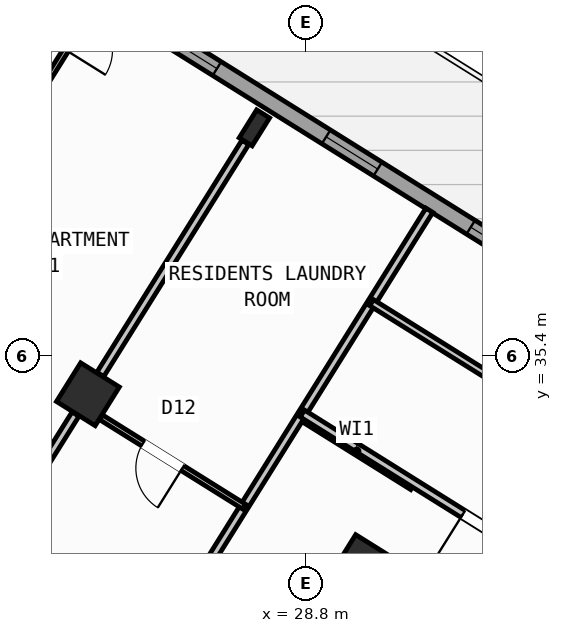
"""IFC4 building model, lengths in metres.
Left out: names, types, materials, properties, quantities, classifications, styles, units other than length and angle.
Written with IfcOpenShell. Run it as: python <this file> out.ifc"""

import sys

from ifc_helpers import new_model, si_unit, direction, frame, frame_2d, origin, origin_2d, place, context, subcontext, project, spatial, rectangle, hollow_rectangle, i_section, extrude, source, transform, mapped, element, fill, save


model = new_model("IFC4")
c1 = context("Model", 3, precision=1e-05, world=origin(), true_north=direction((0.0, 1.0)))
c2 = subcontext(c1, "Body", "Model", "MODEL_VIEW")
j1 = project(units=[si_unit("LENGTHUNIT", "METRE"), si_unit("PLANEANGLEUNIT", "RADIAN")], contexts=[c1])
p1 = place(None, origin())
s1 = spatial("IfcSite", under=j1, at=p1, CompositionType="ELEMENT")
p2 = place(p1, origin())
s2 = spatial("IfcBuilding", under=s1, at=p2, CompositionType="ELEMENT")
p3 = place(p2, frame((0.0, 0.0, 105.3)))
s3 = spatial("IfcBuildingStorey", under=s2, at=p3, CompositionType="ELEMENT", Elevation=105.3)
m1 = source(origin(), c2, "Body", "SweptSolid", [
    extrude(hollow_rectangle(XDim=0.9, YDim=0.9, WallThickness=0.036, at=origin_2d()), origin(), (0.0, 0.0, 1.0), 3.6),
])
p4 = place(p3, frame((29.928, 31.251, 0.0), z_axis=(0.0, 0.0, 1.0), x_axis=(-0.848048096156, 0.529919264233, 0.0)))
e1 = element("IfcColumn", 1, at=p4, inside=s3, PredefinedType="COLUMN", context=c2, shape_type="MappedRepresentation", body=[
    mapped(m1, transform((0.0, 0.0, 0.0), scale=1.0)),
])
m2 = source(origin(), c2, "Body", "SweptSolid", [
    extrude(i_section(OverallWidth=0.3, OverallDepth=0.65, WebThickness=0.016, FlangeThickness=0.031, at=origin_2d()), origin(), (0.0, 0.0, 1.0), 3.6),
])
p5 = place(p3, frame((27.786, 39.901, 0.0), z_axis=(0.0, 0.0, 1.0), x_axis=(-0.848048096156, 0.529919264233, 0.0)))
e2 = element("IfcColumn", 2, at=p5, inside=s3, PredefinedType="COLUMN", context=c2, shape_type="MappedRepresentation", body=[
    mapped(m2, transform((0.0, 0.0, 0.0), scale=1.0)),
])
p6 = place(p3, frame((24.5, 34.643, 0.0), z_axis=(0.0, 0.0, 1.0), x_axis=(-0.848048096156, 0.529919264233, 0.0)))
e3 = element("IfcColumn", 3, at=p6, inside=s3, PredefinedType="COLUMN", context=c2, shape_type="MappedRepresentation", body=[
    mapped(m1, transform((0.0, 0.0, 0.0), scale=1.0)),
])
p7 = place(p3, frame((17.424, 47.083, 0.0), z_axis=(0.0, 0.0, 1.0), x_axis=(0.848049927979, -0.529916332693, 0.0)))
e4 = element("IfcWall", 4, at=p7, inside=s3, PredefinedType="STANDARD", context=c2, shape_type="SweptSolid", body=[
    extrude(rectangle(XDim=29.223, YDim=0.32, at=frame_2d((14.612, 0.0))), origin(), (0.0, 0.0, 1.0), 3.35),
])
p8 = place(p7, frame((3.709, 0.0, 0.0)))
e5 = element("IfcOpeningElement", 5, at=p8, cuts=e4, PredefinedType="OPENING", context=c2, shape_type="SweptSolid", body=[
    extrude(rectangle(XDim=1.05, YDim=2.15, at=frame_2d((0.525, 1.075))), frame((0.0, 0.17, 0.0), z_axis=(0.0, -1.0, 0.0), x_axis=(1.0, 0.0, 0.0)), (0.0, 0.0, 1.0), 0.34),
])
p9 = place(p7, frame((0.659, 0.0, 0.95)))
e6 = element("IfcOpeningElement", 6, at=p9, cuts=e4, PredefinedType="OPENING", context=c2, shape_type="SweptSolid", body=[
    extrude(rectangle(XDim=1.2, YDim=1.4, at=frame_2d((0.6, 0.7))), frame((0.0, 0.17, 0.0), z_axis=(0.0, -1.0, 0.0), x_axis=(1.0, 0.0, 0.0)), (0.0, 0.0, 1.0), 0.34),
])
p10 = place(p7, frame((6.972, 0.0, 1.0)))
e7 = element("IfcOpeningElement", 7, at=p10, cuts=e4, PredefinedType="OPENING", context=c2, shape_type="SweptSolid", body=[
    extrude(rectangle(XDim=0.9, YDim=1.25, at=frame_2d((0.45, 0.625))), frame((0.0, 0.17, 0.0), z_axis=(0.0, -1.0, 0.0), x_axis=(1.0, 0.0, 0.0)), (0.0, 0.0, 1.0), 0.34),
])
p11 = place(p7, frame((9.847, 0.0, 0.85)))
e8 = element("IfcOpeningElement", 8, at=p11, cuts=e4, PredefinedType="OPENING", context=c2, shape_type="SweptSolid", body=[
    extrude(rectangle(XDim=1.5, YDim=1.5, at=frame_2d((0.75, 0.75))), frame((0.0, 0.17, 0.0), z_axis=(0.0, -1.0, 0.0), x_axis=(1.0, 0.0, 0.0)), (0.0, 0.0, 1.0), 0.34),
])
p12 = place(p7, frame((13.889, 0.0, 0.95)))
e9 = element("IfcOpeningElement", 9, at=p12, cuts=e4, PredefinedType="OPENING", context=c2, shape_type="SweptSolid", body=[
    extrude(rectangle(XDim=1.2, YDim=1.4, at=frame_2d((0.6, 0.7))), frame((0.0, 0.17, 0.0), z_axis=(0.0, -1.0, 0.0), x_axis=(1.0, 0.0, 0.0)), (0.0, 0.0, 1.0), 0.34),
])
p13 = place(p7, frame((17.254, 0.0, 1.0)))
e10 = element("IfcOpeningElement", 10, at=p13, cuts=e4, PredefinedType="OPENING", context=c2, shape_type="SweptSolid", body=[
    extrude(rectangle(XDim=0.9, YDim=1.25, at=frame_2d((0.45, 0.625))), frame((0.0, 0.17, 0.0), z_axis=(0.0, -1.0, 0.0), x_axis=(1.0, 0.0, 0.0)), (0.0, 0.0, 1.0), 0.34),
])
p14 = place(p7, frame((20.764, 0.0, 0.8)))
e11 = element("IfcOpeningElement", 11, at=p14, cuts=e4, PredefinedType="OPENING", context=c2, shape_type="SweptSolid", body=[
    extrude(rectangle(XDim=2.1, YDim=1.55, at=frame_2d((1.05, 0.775))), frame((0.0, 0.17, 0.0), z_axis=(0.0, -1.0, 0.0), x_axis=(1.0, 0.0, 0.0)), (0.0, 0.0, 1.0), 0.34),
])
p15 = place(p7, frame((25.403, 0.0, 0.8)))
e12 = element("IfcOpeningElement", 12, at=p15, cuts=e4, PredefinedType="OPENING", context=c2, shape_type="SweptSolid", body=[
    extrude(rectangle(XDim=2.1, YDim=1.55, at=frame_2d((1.05, 0.775))), frame((0.0, 0.17, 0.0), z_axis=(0.0, -1.0, 0.0), x_axis=(1.0, 0.0, 0.0)), (0.0, 0.0, 1.0), 0.34),
])
p16 = place(p3, frame((30.914, 32.829, 0.0), z_axis=(0.0, 0.0, 1.0), x_axis=(-0.848008813643, 0.529982124211, 0.0)))
e13 = element("IfcWall", 13, at=p16, inside=s3, PredefinedType="PARTITIONING", context=c2, shape_type="SweptSolid", body=[
    extrude(rectangle(XDim=2.61, YDim=0.16, at=frame_2d((1.305, 0.0))), origin(), (0.0, 0.0, 1.0), 3.34),
])
p17 = place(p3, frame((31.239, 38.274, 0.0), z_axis=(0.0, 0.0, 1.0), x_axis=(-0.529918119251, -0.84804881162, 0.0)))
e14 = element("IfcWall", 14, at=p17, inside=s3, PredefinedType="PARTITIONING", context=c2, shape_type="SweptSolid", body=[
    extrude(rectangle(XDim=17.65, YDim=0.16, at=frame_2d((8.825, 0.0))), origin(), (0.0, 0.0, 1.0), 3.34),
])
p18 = place(p3, frame((27.607, 39.615, 0.0), z_axis=(0.0, 0.0, 1.0), x_axis=(-0.529913610495, -0.848051628978, 0.0)))
e15 = element("IfcWall", 15, at=p18, inside=s3, PredefinedType="PARTITIONING", context=c2, shape_type="SweptSolid", body=[
    extrude(rectangle(XDim=5.401, YDim=0.16, at=frame_2d((2.7, 0.0))), origin(), (0.0, 0.0, 1.0), 2.775),
])
p19 = place(p3, frame((24.256, 34.251, 0.0), z_axis=(0.0, 0.0, 1.0), x_axis=(-0.529919772691, -0.848047778437, 0.0)))
e16 = element("IfcWall", 16, at=p19, inside=s3, PredefinedType="PARTITIONING", context=c2, shape_type="SweptSolid", body=[
    extrude(rectangle(XDim=6.376, YDim=0.16, at=frame_2d((3.188, 0.0))), origin(), (0.0, 0.0, 1.0), 2.775),
])
p20 = place(p3, frame((27.583, 32.424, 0.0), z_axis=(0.0, 0.0, 1.0), x_axis=(-0.848031272749, 0.529946186362, 0.0)))
e17 = element("IfcWall", 17, at=p20, inside=s3, PredefinedType="PARTITIONING", context=c2, shape_type="SweptSolid", body=[
    extrude(rectangle(XDim=3.328, YDim=0.11, at=frame_2d((1.664, 0.0))), origin(), (0.0, 0.0, 1.0), 2.775),
])
p21 = place(p20, frame((1.435, 0.0, 0.0)))
e18 = element("IfcOpeningElement", 18, at=p21, cuts=e17, PredefinedType="OPENING", context=c2, shape_type="SweptSolid", body=[
    extrude(rectangle(XDim=0.92, YDim=2.08, at=frame_2d((0.46, 1.04))), frame((0.0, 0.065, 0.0), z_axis=(0.0, -1.0, 0.0), x_axis=(1.0, 0.0, 0.0)), (0.0, 0.0, 1.0), 0.13),
])
p22 = place(p3, frame((24.802, 42.614, 0.0), z_axis=(0.0, 0.0, 1.0), x_axis=(-0.529928839727, -0.848042112649, 0.0)))
e19 = element("IfcWall", 19, at=p22, inside=s3, PredefinedType="PARTITIONING", context=c2, shape_type="SweptSolid", body=[
    extrude(rectangle(XDim=15.34, YDim=0.11, at=frame_2d((7.67, 0.0))), origin(), (0.0, 0.0, 1.0), 3.34),
])
p23 = place(p22, frame((0.47, 0.0, 0.0)))
e20 = element("IfcOpeningElement", 20, at=p23, cuts=e19, PredefinedType="OPENING", context=c2, shape_type="SweptSolid", body=[
    extrude(rectangle(XDim=0.92, YDim=2.08, at=frame_2d((0.46, 1.04))), frame((0.0, 0.065, 0.0), z_axis=(0.0, -1.0, 0.0), x_axis=(1.0, 0.0, 0.0)), (0.0, 0.0, 1.0), 0.13),
])
p24 = place(p3, frame((41.936, 26.012, 0.0), z_axis=(0.0, 0.0, 1.0), x_axis=(-0.848051154596, 0.529914369676, 0.0)))
e21 = element("IfcWall", 21, at=p24, inside=s3, PredefinedType="PARTITIONING", context=c2, shape_type="SweptSolid", body=[
    extrude(rectangle(XDim=15.57, YDim=0.16, at=frame_2d((7.785, 0.0))), origin(), (0.0, 0.0, 1.0), 3.34),
])
p25 = place(p24, frame((10.83, 0.0, 0.0)))
e22 = element("IfcOpeningElement", 22, at=p25, cuts=e21, PredefinedType="OPENING", context=c2, shape_type="SweptSolid", body=[
    extrude(rectangle(XDim=1.0, YDim=2.1, at=frame_2d((0.5, 1.05))), frame((0.0, 0.09, 0.0), z_axis=(0.0, -1.0, 0.0), x_axis=(1.0, 0.0, 0.0)), (0.0, 0.0, 1.0), 0.18),
])
p26 = place(p3, frame((42.226, 28.873, 0.0), z_axis=(0.0, 0.0, 1.0), x_axis=(-0.848049134363, 0.529917602752, 0.0)))
e23 = element("IfcWall", 23, at=p26, inside=s3, PredefinedType="PLUMBINGWALL", context=c2, shape_type="SweptSolid", body=[
    extrude(rectangle(XDim=14.3, YDim=0.14, at=frame_2d((7.15, 0.0))), origin(), (0.0, 0.0, 1.0), 3.34),
])
p27 = place(p26, frame((9.57, 0.0, 0.0)))
e24 = element("IfcOpeningElement", 24, at=p27, cuts=e23, PredefinedType="OPENING", context=c2, shape_type="SweptSolid", body=[
    extrude(rectangle(XDim=0.92, YDim=2.08, at=frame_2d((0.46, 1.04))), frame((0.0, 0.08, 0.0), z_axis=(0.0, -1.0, 0.0), x_axis=(1.0, 0.0, 0.0)), (0.0, 0.0, 1.0), 0.16),
])
m3 = source(origin(), c2, "Body", "SweptSolid", [
    extrude(rectangle(XDim=1.5, YDim=1.5, at=frame_2d((0.75, 0.75))), frame((0.0, 0.03, 0.0), z_axis=(0.0, -1.0, 0.0), x_axis=(1.0, 0.0, 0.0)), (0.0, 0.0, 1.0), 0.06),
])
p28 = place(p11, origin())
e25 = element("IfcWindow", 25, at=p28, inside=s3, PartitioningType="SINGLE_PANEL", PredefinedType="WINDOW", context=c2, shape_type="MappedRepresentation", body=[
    mapped(m3, transform((0.0, 0.0, 0.0), scale=1.0)),
])
fill(e8, e25)
m4 = source(origin(), c2, "Body", "SweptSolid", [
    extrude(rectangle(XDim=1.2, YDim=1.4, at=frame_2d((0.6, 0.7))), frame((0.0, 0.03, 0.0), z_axis=(0.0, -1.0, 0.0), x_axis=(1.0, 0.0, 0.0)), (0.0, 0.0, 1.0), 0.06),
])
p29 = place(p12, origin())
e26 = element("IfcWindow", 26, at=p29, inside=s3, PartitioningType="SINGLE_PANEL", PredefinedType="WINDOW", context=c2, shape_type="MappedRepresentation", body=[
    mapped(m4, transform((0.0, 0.0, 0.0), scale=1.0)),
])
fill(e9, e26)
m5 = source(origin(), c2, "Body", "SweptSolid", [
    extrude(rectangle(XDim=0.9, YDim=1.25, at=frame_2d((0.45, 0.625))), frame((0.0, 0.03, 0.0), z_axis=(0.0, -1.0, 0.0), x_axis=(1.0, 0.0, 0.0)), (0.0, 0.0, 1.0), 0.06),
])
p30 = place(p13, origin())
e27 = element("IfcWindow", 27, at=p30, inside=s3, PartitioningType="SINGLE_PANEL", PredefinedType="WINDOW", context=c2, shape_type="MappedRepresentation", body=[
    mapped(m5, transform((0.0, 0.0, 0.0), scale=1.0)),
])
fill(e10, e27)
m6 = source(origin(), c2, "Body", "SweptSolid", [
    extrude(rectangle(XDim=0.92, YDim=2.08, at=frame_2d((0.46, 1.04))), frame((0.0, 0.025, 0.0), z_axis=(0.0, -1.0, 0.0), x_axis=(1.0, 0.0, 0.0)), (0.0, 0.0, 1.0), 0.05),
])
p31 = place(p21, origin())
e28 = element("IfcDoor", 28, at=p31, inside=s3, OperationType="SINGLE_SWING_LEFT", PredefinedType="DOOR", context=c2, shape_type="MappedRepresentation", body=[
    mapped(m6, transform((0.0, 0.0, 0.0), scale=1.0)),
])
fill(e18, e28)
m7 = source(origin(), c2, "Body", "SweptSolid", [
    extrude(rectangle(XDim=1.0, YDim=2.1, at=frame_2d((0.5, 1.05))), frame((0.0, 0.025, 0.0), z_axis=(0.0, -1.0, 0.0), x_axis=(1.0, 0.0, 0.0)), (0.0, 0.0, 1.0), 0.05),
])
p32 = place(p25, origin())
e29 = element("IfcDoor", 29, at=p32, inside=s3, OperationType="SINGLE_SWING_RIGHT", PredefinedType="DOOR", context=c2, shape_type="MappedRepresentation", body=[
    mapped(m7, transform((0.0, 0.0, 0.0), scale=1.0)),
])
fill(e22, e29)
save(model, sys.argv[1])
